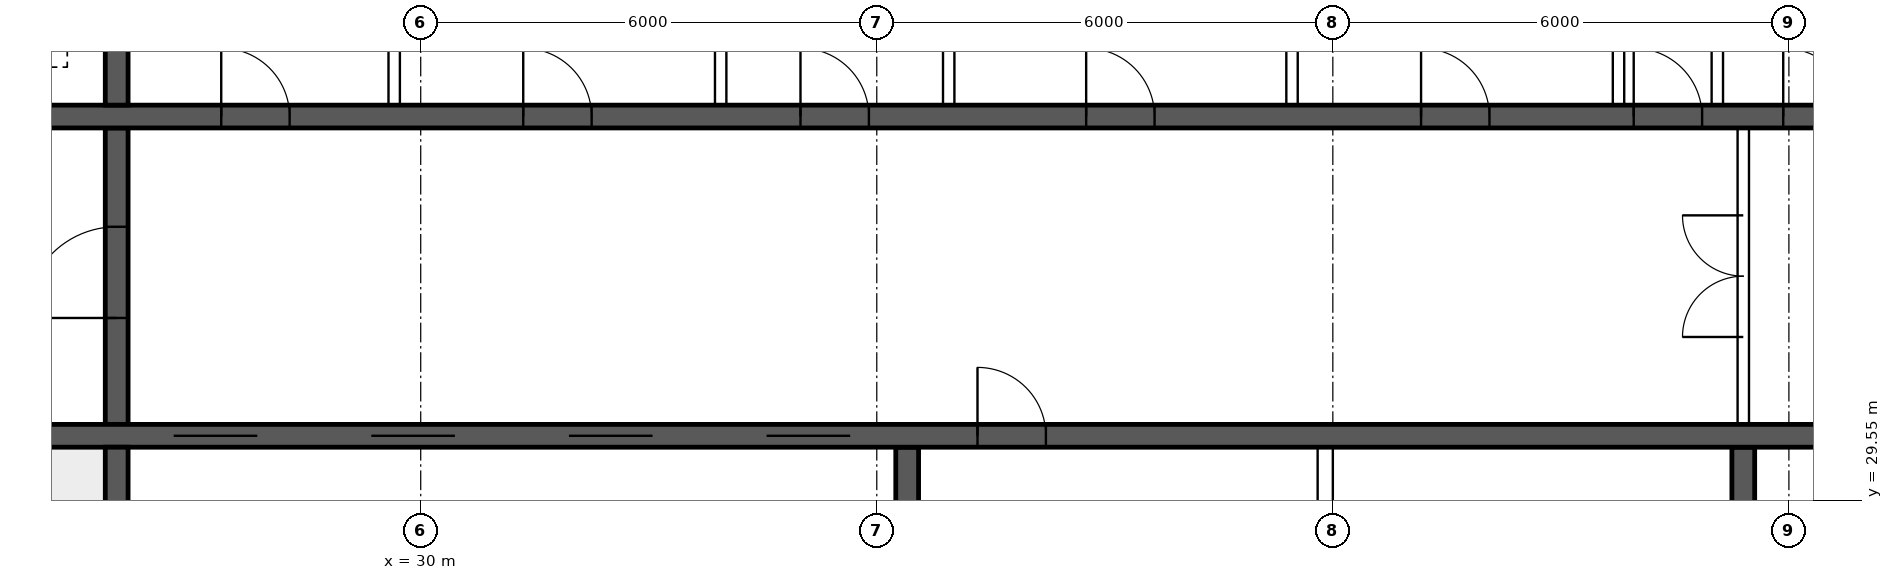
"""IFC4 building model, lengths in metres.
Left out: names, types, materials, properties, quantities, classifications, styles, units other than length and angle.
Written with IfcOpenShell. Run it as: python <this file> out.ifc"""

import sys

from ifc_helpers import new_model, si_unit, direction, frame, frame_2d, origin, place, context, subcontext, project, spatial, rectangle, extrude, element, fill, save


model = new_model("IFC4")
c1 = context("Model", 3, precision=1e-05, world=origin(), true_north=direction((0.0, 1.0)))
c2 = subcontext(c1, "Body", "Model", "MODEL_VIEW")
j1 = project(units=[si_unit("LENGTHUNIT", "METRE"), si_unit("PLANEANGLEUNIT", "RADIAN")], contexts=[c1])
p1 = place(None, origin())
s1 = spatial("IfcSite", under=j1, at=p1, CompositionType="ELEMENT")
p2 = place(p1, origin())
s2 = spatial("IfcBuilding", under=s1, at=p2, CompositionType="ELEMENT")
p3 = place(p2, frame((0.0, 0.0, 174.85)))
s3 = spatial("IfcBuildingStorey", under=s2, at=p3, CompositionType="ELEMENT", Elevation=174.85)
p4 = place(p3, frame((18.425, 30.4, 0.0), z_axis=(0.0, 0.0, 1.0), x_axis=(1.0, 0.0, 0.0)))
e1 = element("IfcWall", 1, at=p4, inside=s3, PredefinedType="SHEAR", context=c2, shape_type="SweptSolid", body=[
    extrude(rectangle(XDim=47.15, YDim=0.3, at=frame_2d((23.575, 0.0))), origin(), (0.0, 0.0, 1.0), 3.75),
])
p5 = place(p4, frame((0.4, 0.0, 0.0)))
e2 = element("IfcOpeningElement", 2, at=p5, cuts=e1, PredefinedType="OPENING", context=c2, shape_type="SweptSolid", body=[
    extrude(rectangle(XDim=1.0, YDim=2.1, at=frame_2d((0.5, 1.05))), frame((0.0, 0.16, 0.0), z_axis=(0.0, -1.0, 0.0), x_axis=(1.0, 0.0, 0.0)), (0.0, 0.0, 1.0), 0.32),
])
p6 = place(p4, frame((45.75, 0.0, 0.0)))
e3 = element("IfcOpeningElement", 3, at=p6, cuts=e1, PredefinedType="OPENING", context=c2, shape_type="SweptSolid", body=[
    extrude(rectangle(XDim=1.0, YDim=2.1, at=frame_2d((0.5, 1.05))), frame((0.0, 0.16, 0.0), z_axis=(0.0, -1.0, 0.0), x_axis=(1.0, 0.0, 0.0)), (0.0, 0.0, 1.0), 0.32),
])
p7 = place(p4, frame((8.325, 0.0, 0.0)))
e4 = element("IfcOpeningElement", 4, at=p7, cuts=e1, PredefinedType="OPENING", context=c2, shape_type="SweptSolid", body=[
    extrude(rectangle(XDim=1.1, YDim=2.1, at=frame_2d((0.55, 1.05))), frame((0.0, 0.16, 0.0), z_axis=(0.0, -1.0, 0.0), x_axis=(1.0, 0.0, 0.0)), (0.0, 0.0, 1.0), 0.32),
])
p8 = place(p4, frame((10.925, 0.0, 0.0)))
e5 = element("IfcOpeningElement", 5, at=p8, cuts=e1, PredefinedType="OPENING", context=c2, shape_type="SweptSolid", body=[
    extrude(rectangle(XDim=1.1, YDim=2.1, at=frame_2d((0.55, 1.05))), frame((0.0, 0.16, 0.0), z_axis=(0.0, -1.0, 0.0), x_axis=(1.0, 0.0, 0.0)), (0.0, 0.0, 1.0), 0.32),
])
p9 = place(p4, frame((13.525, 0.0, 0.0)))
e6 = element("IfcOpeningElement", 6, at=p9, cuts=e1, PredefinedType="OPENING", context=c2, shape_type="SweptSolid", body=[
    extrude(rectangle(XDim=1.1, YDim=2.1, at=frame_2d((0.55, 1.05))), frame((0.0, 0.16, 0.0), z_axis=(0.0, -1.0, 0.0), x_axis=(1.0, 0.0, 0.0)), (0.0, 0.0, 1.0), 0.32),
])
p10 = place(p4, frame((16.125, 0.0, 0.0)))
e7 = element("IfcOpeningElement", 7, at=p10, cuts=e1, PredefinedType="OPENING", context=c2, shape_type="SweptSolid", body=[
    extrude(rectangle(XDim=1.1, YDim=2.1, at=frame_2d((0.55, 1.05))), frame((0.0, 0.16, 0.0), z_axis=(0.0, -1.0, 0.0), x_axis=(1.0, 0.0, 0.0)), (0.0, 0.0, 1.0), 0.32),
])
p11 = place(p4, frame((18.9, 0.0, 0.0)))
e8 = element("IfcOpeningElement", 8, at=p11, cuts=e1, PredefinedType="OPENING", context=c2, shape_type="SweptSolid", body=[
    extrude(rectangle(XDim=0.9, YDim=2.1, at=frame_2d((0.45, 1.05))), frame((0.0, 0.16, 0.0), z_axis=(0.0, -1.0, 0.0), x_axis=(1.0, 0.0, 0.0)), (0.0, 0.0, 1.0), 0.32),
])
p12 = place(p4, frame((30.192, 0.0, 0.0)))
e9 = element("IfcOpeningElement", 9, at=p12, cuts=e1, PredefinedType="OPENING", context=c2, shape_type="SweptSolid", body=[
    extrude(rectangle(XDim=1.1, YDim=2.1, at=frame_2d((0.55, 1.05))), frame((0.0, 0.16, 0.0), z_axis=(0.0, -1.0, 0.0), x_axis=(1.0, 0.0, 0.0)), (0.0, 0.0, 1.0), 0.32),
])
p13 = place(p4, frame((33.725, 0.0, 0.0)))
e10 = element("IfcOpeningElement", 10, at=p13, cuts=e1, PredefinedType="OPENING", context=c2, shape_type="SweptSolid", body=[
    extrude(rectangle(XDim=1.1, YDim=2.1, at=frame_2d((0.55, 1.05))), frame((0.0, 0.16, 0.0), z_axis=(0.0, -1.0, 0.0), x_axis=(1.0, 0.0, 0.0)), (0.0, 0.0, 1.0), 0.32),
])
p14 = place(p4, frame((37.258, 0.0, 0.0)))
e11 = element("IfcOpeningElement", 11, at=p14, cuts=e1, PredefinedType="OPENING", context=c2, shape_type="SweptSolid", body=[
    extrude(rectangle(XDim=1.1, YDim=2.1, at=frame_2d((0.55, 1.05))), frame((0.0, 0.16, 0.0), z_axis=(0.0, -1.0, 0.0), x_axis=(1.0, 0.0, 0.0)), (0.0, 0.0, 1.0), 0.32),
])
p15 = place(p3, frame((18.425, 34.6, 0.0), z_axis=(0.0, 0.0, 1.0), x_axis=(1.0, 0.0, 0.0)))
e12 = element("IfcWall", 12, at=p15, inside=s3, PredefinedType="SHEAR", context=c2, shape_type="SweptSolid", body=[
    extrude(rectangle(XDim=47.15, YDim=0.3, at=frame_2d((23.575, 0.0))), origin(), (0.0, 0.0, 1.0), 3.75),
])
p16 = place(p15, frame((0.9, 0.0, 0.0)))
e13 = element("IfcOpeningElement", 13, at=p16, cuts=e12, PredefinedType="OPENING", context=c2, shape_type="SweptSolid", body=[
    extrude(rectangle(XDim=1.1, YDim=2.1, at=frame_2d((0.55, 1.05))), frame((0.0, 0.16, 0.0), z_axis=(0.0, -1.0, 0.0), x_axis=(1.0, 0.0, 0.0)), (0.0, 0.0, 1.0), 0.32),
])
p17 = place(p15, frame((45.15, 0.0, 0.0)))
e14 = element("IfcOpeningElement", 14, at=p17, cuts=e12, PredefinedType="OPENING", context=c2, shape_type="SweptSolid", body=[
    extrude(rectangle(XDim=1.1, YDim=2.1, at=frame_2d((0.55, 1.05))), frame((0.0, 0.16, 0.0), z_axis=(0.0, -1.0, 0.0), x_axis=(1.0, 0.0, 0.0)), (0.0, 0.0, 1.0), 0.32),
])
p18 = place(p15, frame((4.175, 0.0, 0.0)))
e15 = element("IfcOpeningElement", 15, at=p18, cuts=e12, PredefinedType="OPENING", context=c2, shape_type="SweptSolid", body=[
    extrude(rectangle(XDim=0.9, YDim=2.1, at=frame_2d((0.45, 1.05))), frame((0.0, 0.16, 0.0), z_axis=(0.0, -1.0, 0.0), x_axis=(1.0, 0.0, 0.0)), (0.0, 0.0, 1.0), 0.32),
])
p19 = place(p15, frame((42.075, 0.0, 0.0)))
e16 = element("IfcOpeningElement", 16, at=p19, cuts=e12, PredefinedType="OPENING", context=c2, shape_type="SweptSolid", body=[
    extrude(rectangle(XDim=0.9, YDim=2.1, at=frame_2d((0.45, 1.05))), frame((0.0, 0.16, 0.0), z_axis=(0.0, -1.0, 0.0), x_axis=(1.0, 0.0, 0.0)), (0.0, 0.0, 1.0), 0.32),
])
p20 = place(p15, frame((8.95, 0.0, 0.0)))
e17 = element("IfcOpeningElement", 17, at=p20, cuts=e12, PredefinedType="OPENING", context=c2, shape_type="SweptSolid", body=[
    extrude(rectangle(XDim=0.9, YDim=2.1, at=frame_2d((0.45, 1.05))), frame((0.0, 0.16, 0.0), z_axis=(0.0, -1.0, 0.0), x_axis=(1.0, 0.0, 0.0)), (0.0, 0.0, 1.0), 0.32),
])
p21 = place(p15, frame((12.924, 0.0, 0.0)))
e18 = element("IfcOpeningElement", 18, at=p21, cuts=e12, PredefinedType="OPENING", context=c2, shape_type="SweptSolid", body=[
    extrude(rectangle(XDim=0.9, YDim=2.1, at=frame_2d((0.45, 1.05))), frame((0.0, 0.16, 0.0), z_axis=(0.0, -1.0, 0.0), x_axis=(1.0, 0.0, 0.0)), (0.0, 0.0, 1.0), 0.32),
])
p22 = place(p15, frame((16.571, 0.0, 0.0)))
e19 = element("IfcOpeningElement", 19, at=p22, cuts=e12, PredefinedType="OPENING", context=c2, shape_type="SweptSolid", body=[
    extrude(rectangle(XDim=0.9, YDim=2.1, at=frame_2d((0.45, 1.05))), frame((0.0, 0.16, 0.0), z_axis=(0.0, -1.0, 0.0), x_axis=(1.0, 0.0, 0.0)), (0.0, 0.0, 1.0), 0.32),
])
p23 = place(p15, frame((20.33, 0.0, 0.0)))
e20 = element("IfcOpeningElement", 20, at=p23, cuts=e12, PredefinedType="OPENING", context=c2, shape_type="SweptSolid", body=[
    extrude(rectangle(XDim=0.9, YDim=2.1, at=frame_2d((0.45, 1.05))), frame((0.0, 0.16, 0.0), z_axis=(0.0, -1.0, 0.0), x_axis=(1.0, 0.0, 0.0)), (0.0, 0.0, 1.0), 0.32),
])
p24 = place(p15, frame((24.736, 0.0, 0.0)))
e21 = element("IfcOpeningElement", 21, at=p24, cuts=e12, PredefinedType="OPENING", context=c2, shape_type="SweptSolid", body=[
    extrude(rectangle(XDim=0.9, YDim=2.1, at=frame_2d((0.45, 1.05))), frame((0.0, 0.16, 0.0), z_axis=(0.0, -1.0, 0.0), x_axis=(1.0, 0.0, 0.0)), (0.0, 0.0, 1.0), 0.32),
])
p25 = place(p15, frame((27.533, 0.0, 0.0)))
e22 = element("IfcOpeningElement", 22, at=p25, cuts=e12, PredefinedType="OPENING", context=c2, shape_type="SweptSolid", body=[
    extrude(rectangle(XDim=0.9, YDim=2.1, at=frame_2d((0.45, 1.05))), frame((0.0, 0.16, 0.0), z_axis=(0.0, -1.0, 0.0), x_axis=(1.0, 0.0, 0.0)), (0.0, 0.0, 1.0), 0.32),
])
p26 = place(p15, frame((29.5, 0.0, 0.0)))
e23 = element("IfcOpeningElement", 23, at=p26, cuts=e12, PredefinedType="OPENING", context=c2, shape_type="SweptSolid", body=[
    extrude(rectangle(XDim=0.9, YDim=2.1, at=frame_2d((0.45, 1.05))), frame((0.0, 0.16, 0.0), z_axis=(0.0, -1.0, 0.0), x_axis=(1.0, 0.0, 0.0)), (0.0, 0.0, 1.0), 0.32),
])
p27 = place(p15, frame((31.932, 0.0, 0.0)))
e24 = element("IfcOpeningElement", 24, at=p27, cuts=e12, PredefinedType="OPENING", context=c2, shape_type="SweptSolid", body=[
    extrude(rectangle(XDim=0.9, YDim=2.1, at=frame_2d((0.45, 1.05))), frame((0.0, 0.16, 0.0), z_axis=(0.0, -1.0, 0.0), x_axis=(1.0, 0.0, 0.0)), (0.0, 0.0, 1.0), 0.32),
])
p28 = place(p15, frame((34.667, 0.0, 0.0)))
e25 = element("IfcOpeningElement", 25, at=p28, cuts=e12, PredefinedType="OPENING", context=c2, shape_type="SweptSolid", body=[
    extrude(rectangle(XDim=0.9, YDim=2.1, at=frame_2d((0.45, 1.05))), frame((0.0, 0.16, 0.0), z_axis=(0.0, -1.0, 0.0), x_axis=(1.0, 0.0, 0.0)), (0.0, 0.0, 1.0), 0.32),
])
p29 = place(p15, frame((37.707, 0.0, 0.0)))
e26 = element("IfcOpeningElement", 26, at=p29, cuts=e12, PredefinedType="OPENING", context=c2, shape_type="SweptSolid", body=[
    extrude(rectangle(XDim=0.9, YDim=2.1, at=frame_2d((0.45, 1.05))), frame((0.0, 0.16, 0.0), z_axis=(0.0, -1.0, 0.0), x_axis=(1.0, 0.0, 0.0)), (0.0, 0.0, 1.0), 0.32),
])
p30 = place(p3, frame((26.0, 26.225, 0.0), z_axis=(0.0, 0.0, 1.0), x_axis=(0.0, 1.0, 0.0)))
e27 = element("IfcWall", 27, at=p30, inside=s3, PredefinedType="SHEAR", context=c2, shape_type="SweptSolid", body=[
    extrude(rectangle(XDim=4.025, YDim=0.3, at=frame_2d((2.012, 0.0))), origin(), (0.0, 0.0, 1.0), 3.75),
])
p31 = place(p3, frame((26.0, 30.55, 0.0), z_axis=(0.0, 0.0, 1.0), x_axis=(0.0, 1.0, 0.0)))
e28 = element("IfcWall", 28, at=p31, inside=s3, PredefinedType="SHEAR", context=c2, shape_type="SweptSolid", body=[
    extrude(rectangle(XDim=3.9, YDim=0.3, at=frame_2d((1.95, 0.0))), origin(), (0.0, 0.0, 1.0), 3.75),
])
p32 = place(p31, frame((1.4, 0.0, 0.0)))
e29 = element("IfcOpeningElement", 29, at=p32, cuts=e28, PredefinedType="OPENING", context=c2, shape_type="SweptSolid", body=[
    extrude(rectangle(XDim=1.2, YDim=2.1, at=frame_2d((0.6, 1.05))), frame((0.0, 0.16, 0.0), z_axis=(0.0, -1.0, 0.0), x_axis=(1.0, 0.0, 0.0)), (0.0, 0.0, 1.0), 0.32),
])
p33 = place(p3, frame((26.0, 34.75, 0.0), z_axis=(0.0, 0.0, 1.0), x_axis=(0.0, 1.0, 0.0)))
e30 = element("IfcWall", 30, at=p33, inside=s3, PredefinedType="SHEAR", context=c2, shape_type="SweptSolid", body=[
    extrude(rectangle(XDim=3.025, YDim=0.3, at=frame_2d((1.512, 0.0))), origin(), (0.0, 0.0, 1.0), 3.75),
])
for number, where, z_axis, x_axis in (
    (31, (36.4, 26.225, 0.0), (0.0, 0.0, 1.0), (0.0, 1.0, 0.0)),
    (32, (47.4, 26.225, 0.0), (0.0, 0.0, 1.0), (0.0, 1.0, 0.0)),
):
    element("IfcWall", number, at=place(p3, frame(where, z_axis=z_axis, x_axis=x_axis)), inside=s3, PredefinedType="SHEAR", context=c2, shape_type="SweptSolid", body=[
        extrude(rectangle(XDim=4.025, YDim=0.3, at=frame_2d((2.012, 0.0))), origin(), (0.0, 0.0, 1.0), 3.75),
    ])
p34 = place(p3, frame((47.4, 30.55, 0.0), z_axis=(0.0, 0.0, 1.0), x_axis=(0.0, 1.0, 0.0)))
e33 = element("IfcWall", 33, at=p34, inside=s3, PredefinedType="SOLIDWALL", context=c2, shape_type="SweptSolid", body=[
    extrude(rectangle(XDim=3.9, YDim=0.15, at=frame_2d((1.95, 0.0))), origin(), (0.0, 0.0, 1.0), 3.3),
])
p35 = place(p34, frame((1.15, 0.0, 0.0)))
e34 = element("IfcOpeningElement", 34, at=p35, cuts=e33, PredefinedType="OPENING", context=c2, shape_type="SweptSolid", body=[
    extrude(rectangle(XDim=1.6, YDim=2.1, at=frame_2d((0.8, 1.05))), frame((0.0, 0.085, 0.0), z_axis=(0.0, -1.0, 0.0), x_axis=(1.0, 0.0, 0.0)), (0.0, 0.0, 1.0), 0.17),
])
for number, where, z_axis, x_axis in (
    (35, (29.651, 34.75, 0.0), (0.0, 0.0, 1.0), (0.0, 1.0, 0.0)),
    (36, (33.946, 34.75, 0.0), (0.0, 0.0, 1.0), (0.0, 1.0, 0.0)),
    (37, (36.946, 34.75, 0.0), (0.0, 0.0, 1.0), (0.0, 1.0, 0.0)),
    (38, (41.463, 34.75, 0.0), (0.0, 0.0, 1.0), (0.0, 1.0, 0.0)),
    (39, (45.758, 34.75, 0.0), (0.0, 0.0, 1.0), (0.0, 1.0, 0.0)),
    (40, (47.058, 34.75, 0.0), (0.0, 0.0, 1.0), (0.0, 1.0, 0.0)),
):
    element("IfcWall", number, at=place(p3, frame(where, z_axis=z_axis, x_axis=x_axis)), inside=s3, PredefinedType="SOLIDWALL", context=c2, shape_type="SweptSolid", body=[
        extrude(rectangle(XDim=3.025, YDim=0.15, at=frame_2d((1.512, 0.0))), origin(), (0.0, 0.0, 1.0), 3.3),
    ])
p36 = place(p3, frame((41.9, 26.225, 0.0), z_axis=(0.0, 0.0, 1.0), x_axis=(0.0, 1.0, 0.0)))
e41 = element("IfcWall", 41, at=p36, inside=s3, PredefinedType="SOLIDWALL", context=c2, shape_type="SweptSolid", body=[
    extrude(rectangle(XDim=4.025, YDim=0.2, at=frame_2d((2.012, 0.0))), origin(), (0.0, 0.0, 1.0), 3.3),
])
p37 = place(p35, origin())
e42 = element("IfcDoor", 42, at=p37, inside=s3, OperationType="DOUBLE_DOOR_SINGLE_SWING", PredefinedType="DOOR", context=c2, shape_type="SweptSolid", body=[
    extrude(rectangle(XDim=1.6, YDim=2.1, at=frame_2d((0.8, 1.05))), frame((0.0, 0.025, 0.0), z_axis=(0.0, -1.0, 0.0), x_axis=(1.0, 0.0, 0.0)), (0.0, 0.0, 1.0), 0.05),
])
fill(e34, e42)
p38 = place(p32, origin())
e43 = element("IfcDoor", 43, at=p38, inside=s3, OperationType="SINGLE_SWING_LEFT", PredefinedType="DOOR", context=c2, shape_type="SweptSolid", body=[
    extrude(rectangle(XDim=1.2, YDim=2.1, at=frame_2d((0.6, 1.05))), frame((0.0, 0.025, 0.0), z_axis=(0.0, -1.0, 0.0), x_axis=(1.0, 0.0, 0.0)), (0.0, 0.0, 1.0), 0.05),
])
fill(e29, e43)
p39 = place(p20, origin())
e44 = element("IfcDoor", 44, at=p39, inside=s3, OperationType="SINGLE_SWING_LEFT", PredefinedType="DOOR", context=c2, shape_type="SweptSolid", body=[
    extrude(rectangle(XDim=0.9, YDim=2.1, at=frame_2d((0.45, 1.05))), frame((0.0, 0.025, 0.0), z_axis=(0.0, -1.0, 0.0), x_axis=(1.0, 0.0, 0.0)), (0.0, 0.0, 1.0), 0.05),
])
fill(e17, e44)
p40 = place(p21, origin())
e45 = element("IfcDoor", 45, at=p40, inside=s3, OperationType="SINGLE_SWING_LEFT", PredefinedType="DOOR", context=c2, shape_type="SweptSolid", body=[
    extrude(rectangle(XDim=0.9, YDim=2.1, at=frame_2d((0.45, 1.05))), frame((0.0, 0.025, 0.0), z_axis=(0.0, -1.0, 0.0), x_axis=(1.0, 0.0, 0.0)), (0.0, 0.0, 1.0), 0.05),
])
fill(e18, e45)
p41 = place(p22, origin())
e46 = element("IfcDoor", 46, at=p41, inside=s3, OperationType="SINGLE_SWING_LEFT", PredefinedType="DOOR", context=c2, shape_type="SweptSolid", body=[
    extrude(rectangle(XDim=0.9, YDim=2.1, at=frame_2d((0.45, 1.05))), frame((0.0, 0.025, 0.0), z_axis=(0.0, -1.0, 0.0), x_axis=(1.0, 0.0, 0.0)), (0.0, 0.0, 1.0), 0.05),
])
fill(e19, e46)
p42 = place(p23, origin())
e47 = element("IfcDoor", 47, at=p42, inside=s3, OperationType="SINGLE_SWING_LEFT", PredefinedType="DOOR", context=c2, shape_type="SweptSolid", body=[
    extrude(rectangle(XDim=0.9, YDim=2.1, at=frame_2d((0.45, 1.05))), frame((0.0, 0.025, 0.0), z_axis=(0.0, -1.0, 0.0), x_axis=(1.0, 0.0, 0.0)), (0.0, 0.0, 1.0), 0.05),
])
fill(e20, e47)
p43 = place(p24, origin())
e48 = element("IfcDoor", 48, at=p43, inside=s3, OperationType="SINGLE_SWING_LEFT", PredefinedType="DOOR", context=c2, shape_type="SweptSolid", body=[
    extrude(rectangle(XDim=0.9, YDim=2.1, at=frame_2d((0.45, 1.05))), frame((0.0, 0.025, 0.0), z_axis=(0.0, -1.0, 0.0), x_axis=(1.0, 0.0, 0.0)), (0.0, 0.0, 1.0), 0.05),
])
fill(e21, e48)
p44 = place(p25, origin())
e49 = element("IfcDoor", 49, at=p44, inside=s3, OperationType="SINGLE_SWING_LEFT", PredefinedType="DOOR", context=c2, shape_type="SweptSolid", body=[
    extrude(rectangle(XDim=0.9, YDim=2.1, at=frame_2d((0.45, 1.05))), frame((0.0, 0.025, 0.0), z_axis=(0.0, -1.0, 0.0), x_axis=(1.0, 0.0, 0.0)), (0.0, 0.0, 1.0), 0.05),
])
fill(e22, e49)
p45 = place(p26, origin())
e50 = element("IfcDoor", 50, at=p45, inside=s3, OperationType="SINGLE_SWING_LEFT", PredefinedType="DOOR", context=c2, shape_type="SweptSolid", body=[
    extrude(rectangle(XDim=0.9, YDim=2.1, at=frame_2d((0.45, 1.05))), frame((0.0, 0.025, 0.0), z_axis=(0.0, -1.0, 0.0), x_axis=(1.0, 0.0, 0.0)), (0.0, 0.0, 1.0), 0.05),
])
fill(e23, e50)
p46 = place(p7, origin())
e51 = element("IfcDoor", 51, at=p46, inside=s3, OperationType="DOUBLE_DOOR_SLIDING", PredefinedType="DOOR", context=c2, shape_type="SweptSolid", body=[
    extrude(rectangle(XDim=1.1, YDim=2.1, at=frame_2d((0.55, 1.05))), frame((0.0, 0.025, 0.0), z_axis=(0.0, -1.0, 0.0), x_axis=(1.0, 0.0, 0.0)), (0.0, 0.0, 1.0), 0.05),
])
fill(e4, e51)
p47 = place(p8, origin())
e52 = element("IfcDoor", 52, at=p47, inside=s3, OperationType="DOUBLE_DOOR_SLIDING", PredefinedType="DOOR", context=c2, shape_type="SweptSolid", body=[
    extrude(rectangle(XDim=1.1, YDim=2.1, at=frame_2d((0.55, 1.05))), frame((0.0, 0.025, 0.0), z_axis=(0.0, -1.0, 0.0), x_axis=(1.0, 0.0, 0.0)), (0.0, 0.0, 1.0), 0.05),
])
fill(e5, e52)
p48 = place(p9, origin())
e53 = element("IfcDoor", 53, at=p48, inside=s3, OperationType="DOUBLE_DOOR_SLIDING", PredefinedType="DOOR", context=c2, shape_type="SweptSolid", body=[
    extrude(rectangle(XDim=1.1, YDim=2.1, at=frame_2d((0.55, 1.05))), frame((0.0, 0.025, 0.0), z_axis=(0.0, -1.0, 0.0), x_axis=(1.0, 0.0, 0.0)), (0.0, 0.0, 1.0), 0.05),
])
fill(e6, e53)
p49 = place(p10, origin())
e54 = element("IfcDoor", 54, at=p49, inside=s3, OperationType="DOUBLE_DOOR_SLIDING", PredefinedType="DOOR", context=c2, shape_type="SweptSolid", body=[
    extrude(rectangle(XDim=1.1, YDim=2.1, at=frame_2d((0.55, 1.05))), frame((0.0, 0.025, 0.0), z_axis=(0.0, -1.0, 0.0), x_axis=(1.0, 0.0, 0.0)), (0.0, 0.0, 1.0), 0.05),
])
fill(e7, e54)
p50 = place(p11, origin())
e55 = element("IfcDoor", 55, at=p50, inside=s3, OperationType="SINGLE_SWING_LEFT", PredefinedType="DOOR", context=c2, shape_type="SweptSolid", body=[
    extrude(rectangle(XDim=0.9, YDim=2.1, at=frame_2d((0.45, 1.05))), frame((0.0, 0.025, 0.0), z_axis=(0.0, -1.0, 0.0), x_axis=(1.0, 0.0, 0.0)), (0.0, 0.0, 1.0), 0.05),
])
fill(e8, e55)
save(model, sys.argv[1])
